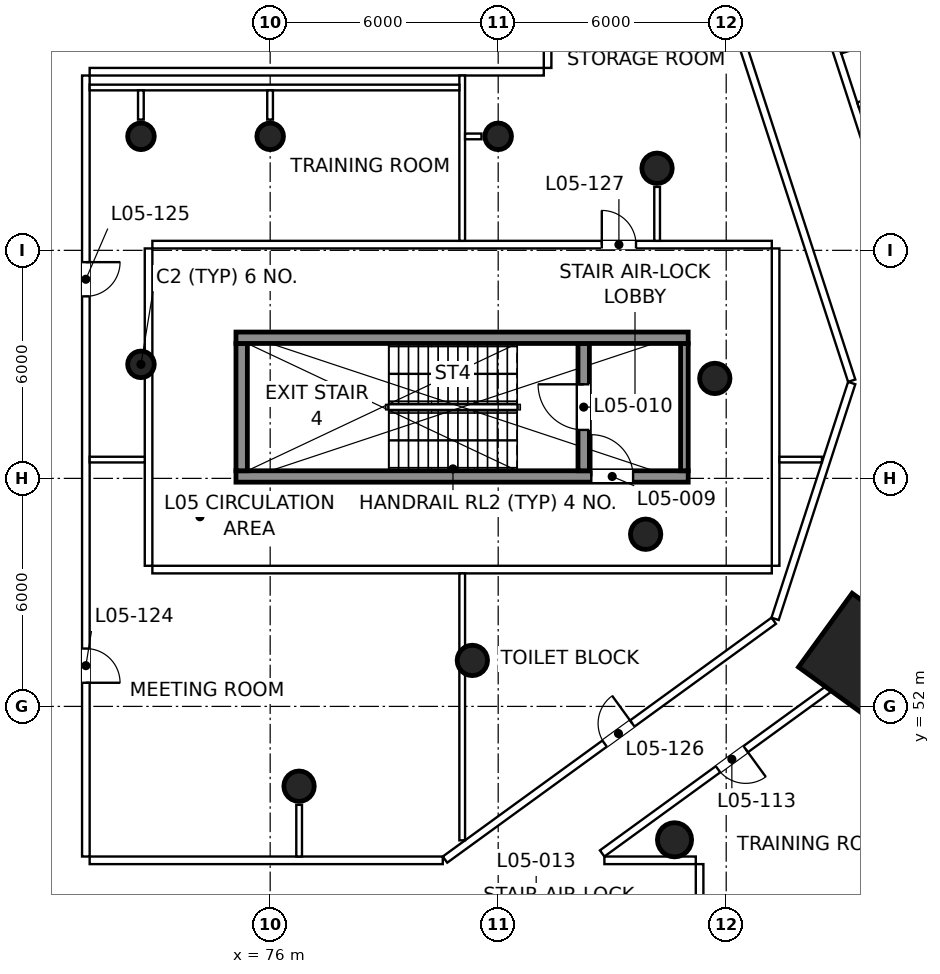
"""IFC4 building model, lengths in metres.
Left out: names, types, materials, properties, quantities, classifications, styles, units other than length and angle.
Written with IfcOpenShell. Run it as: python <this file> out.ifc"""

import sys

from ifc_helpers import new_model, si_unit, direction, frame, frame_2d, origin, origin_2d, place, context, subcontext, project, spatial, rectangle, circle, extrude, element, fill, save


model = new_model("IFC4")
c1 = context("Model", 3, precision=1e-05, world=origin(), true_north=direction((0.0, 1.0)))
c2 = subcontext(c1, "Body", "Model", "MODEL_VIEW")
j1 = project(units=[si_unit("LENGTHUNIT", "METRE"), si_unit("PLANEANGLEUNIT", "RADIAN")], contexts=[c1])
p1 = place(None, origin())
s1 = spatial("IfcSite", under=j1, at=p1, CompositionType="ELEMENT")
p2 = place(p1, origin())
s2 = spatial("IfcBuilding", under=s1, at=p2, CompositionType="ELEMENT")
p3 = place(p2, frame((0.0, 0.0, 34.0)))
s3 = spatial("IfcBuildingStorey", under=s2, at=p3, CompositionType="ELEMENT", Elevation=34.0)
p4 = place(p3, frame((86.64, 48.49, 0.0), z_axis=(0.0, 0.0, 1.0), x_axis=(1.0, 0.0, 0.0)))
e1 = element("IfcColumn", 1, at=p4, inside=s3, PredefinedType="COLUMN", context=c2, shape_type="SweptSolid", body=[
    extrude(circle(Radius=0.45, at=origin_2d()), origin(), (0.0, 0.0, 1.0), 5.0),
])
p5 = place(p3, frame((91.58, 53.3, 0.0), z_axis=(0.0, 0.0, 1.0), x_axis=(0.809016994375, -0.587785252292, 0.0)))
e2 = element("IfcColumn", 2, at=p5, inside=s3, PredefinedType="COLUMN", context=c2, shape_type="SweptSolid", body=[
    extrude(rectangle(XDim=2.4, YDim=2.4, at=origin_2d()), origin(), (0.0, 0.0, 1.0), 5.0),
])
for number, where, z_axis, x_axis in (
    (3, (76.76, 49.9, 0.0), (0.0, 0.0, 1.0), (1.0, 0.0, 0.0)),
    (4, (81.32, 53.21, 0.0), (0.0, 0.0, 1.0), (1.0, 0.0, 0.0)),
    (5, (85.88, 56.53, 0.0), (0.0, 0.0, 1.0), (1.0, 0.0, 0.0)),
    (6, (87.7, 60.63, 0.0), (0.0, 0.0, 1.0), (1.0, 0.0, 0.0)),
    (7, (86.18, 66.16, 0.0), (0.0, 0.0, 1.0), (1.0, 0.0, 0.0)),
):
    element("IfcColumn", number, at=place(p3, frame(where, z_axis=z_axis, x_axis=x_axis)), inside=s3, PredefinedType="COLUMN", context=c2, shape_type="SweptSolid", body=[
        extrude(circle(Radius=0.4, at=origin_2d()), origin(), (0.0, 0.0, 1.0), 5.0),
    ])
for number, where, z_axis, x_axis in (
    (8, (72.6, 61.0, 0.0), (0.0, 0.0, 1.0), (1.0, 0.0, 0.0)),
    (9, (72.6, 67.0, 0.0), (0.0, 0.0, 1.0), (1.0, 0.0, 0.0)),
    (10, (76.0, 67.0, 0.0), (0.0, 0.0, 1.0), (1.0, 0.0, 0.0)),
    (11, (82.0, 67.0, 0.0), (0.0, 0.0, 1.0), (1.0, 0.0, 0.0)),
):
    element("IfcColumn", number, at=place(p3, frame(where, z_axis=z_axis, x_axis=x_axis)), inside=s3, PredefinedType="COLUMN", context=c2, shape_type="SweptSolid", body=[
        extrude(circle(Radius=0.35, at=origin_2d()), origin(), (0.0, 0.0, 1.0), 5.0),
    ])
p6 = place(p3, frame((89.085, 42.836, 0.0), z_axis=(0.0, 0.0, 1.0), x_axis=(0.808999938455, 0.587808727036, 0.0)))
e12 = element("IfcWall", 12, at=p6, inside=s3, PredefinedType="SOLIDWALL", context=c2, shape_type="SweptSolid", body=[
    extrude(rectangle(XDim=9.0, YDim=0.32, at=frame_2d((4.5, 0.0))), origin(), (0.0, 0.0, 1.0), 0.9),
])
p7 = place(p3, frame((75.1, 58.05, 0.0), z_axis=(0.0, 0.0, 1.0), x_axis=(1.0, 0.0, 0.0)))
e13 = element("IfcWall", 13, at=p7, inside=s3, PredefinedType="SHEAR", context=c2, shape_type="SweptSolid", body=[
    extrude(rectangle(XDim=11.9, YDim=0.3, at=frame_2d((5.95, 0.0))), origin(), (0.0, 0.0, 1.0), 5.0),
])
p8 = place(p7, frame((9.35, 0.0, 0.0)))
e14 = element("IfcOpeningElement", 14, at=p8, cuts=e13, PredefinedType="OPENING", context=c2, shape_type="SweptSolid", body=[
    extrude(rectangle(XDim=1.1, YDim=2.1, at=frame_2d((0.55, 1.05))), frame((0.0, 0.16, 0.0), z_axis=(0.0, -1.0, 0.0), x_axis=(1.0, 0.0, 0.0)), (0.0, 0.0, 1.0), 0.32),
])
p9 = place(p3, frame((75.25, 58.2, 0.0), z_axis=(0.0, 0.0, 1.0), x_axis=(0.0, 1.0, 0.0)))
e15 = element("IfcWall", 15, at=p9, inside=s3, PredefinedType="SHEAR", context=c2, shape_type="SweptSolid", body=[
    extrude(rectangle(XDim=3.35, YDim=0.3, at=frame_2d((1.675, 0.0))), origin(), (0.0, 0.0, 1.0), 5.0),
])
p10 = place(p3, frame((84.25, 58.2, 0.0), z_axis=(0.0, 0.0, 1.0), x_axis=(0.0, 1.0, 0.0)))
e16 = element("IfcWall", 16, at=p10, inside=s3, PredefinedType="SHEAR", context=c2, shape_type="SweptSolid", body=[
    extrude(rectangle(XDim=3.35, YDim=0.3, at=frame_2d((1.675, 0.0))), origin(), (0.0, 0.0, 1.0), 5.0),
])
p11 = place(p10, frame((1.075, 0.0, 0.0)))
e17 = element("IfcOpeningElement", 17, at=p11, cuts=e16, PredefinedType="OPENING", context=c2, shape_type="SweptSolid", body=[
    extrude(rectangle(XDim=1.2, YDim=2.1, at=frame_2d((0.6, 1.05))), frame((0.0, 0.16, 0.0), z_axis=(0.0, -1.0, 0.0), x_axis=(1.0, 0.0, 0.0)), (0.0, 0.0, 1.0), 0.32),
])
p12 = place(p3, frame((86.9, 58.2, 0.0), z_axis=(0.0, 0.0, 1.0), x_axis=(0.0, 1.0, 0.0)))
e18 = element("IfcWall", 18, at=p12, inside=s3, PredefinedType="SHEAR", context=c2, shape_type="SweptSolid", body=[
    extrude(rectangle(XDim=3.35, YDim=0.2, at=frame_2d((1.675, 0.0))), origin(), (0.0, 0.0, 1.0), 5.0),
])
p13 = place(p3, frame((75.1, 61.7, 0.0), z_axis=(0.0, 0.0, 1.0), x_axis=(1.0, 0.0, 0.0)))
e19 = element("IfcWall", 19, at=p13, inside=s3, PredefinedType="SHEAR", context=c2, shape_type="SweptSolid", body=[
    extrude(rectangle(XDim=11.9, YDim=0.3, at=frame_2d((5.95, 0.0))), origin(), (0.0, 0.0, 1.0), 5.0),
])
p14 = place(p3, frame((87.105, 80.931, 0.0), z_axis=(0.0, 0.0, 1.0), x_axis=(0.309020575415, -0.951055352737, 0.0)))
e20 = element("IfcWall", 20, at=p14, inside=s3, PredefinedType="PARTITIONING", context=c2, shape_type="SweptSolid", body=[
    extrude(rectangle(XDim=21.409, YDim=0.2, at=frame_2d((10.704, 0.0))), origin(), (0.0, 0.0, 1.0), 3.9),
])
p15 = place(p14, frame((17.129, 0.0, 0.0)))
e21 = element("IfcOpeningElement", 21, at=p15, cuts=e20, PredefinedType="OPENING", context=c2, shape_type="SweptSolid", body=[
    extrude(rectangle(XDim=0.9, YDim=2.1, at=frame_2d((0.45, 1.05))), frame((0.0, 0.11, 0.0), z_axis=(0.0, -1.0, 0.0), x_axis=(1.0, 0.0, 0.0)), (0.0, 0.0, 1.0), 0.22),
])
p16 = place(p14, frame((8.866, 0.0, 0.0)))
e22 = element("IfcOpeningElement", 22, at=p16, cuts=e20, PredefinedType="OPENING", context=c2, shape_type="SweptSolid", body=[
    extrude(rectangle(XDim=0.9, YDim=2.1, at=frame_2d((0.45, 1.05))), frame((0.0, 0.11, 0.0), z_axis=(0.0, -1.0, 0.0), x_axis=(1.0, 0.0, 0.0)), (0.0, 0.0, 1.0), 0.22),
])
p17 = place(p14, frame((2.054, 0.0, 0.0)))
e23 = element("IfcOpeningElement", 23, at=p17, cuts=e20, PredefinedType="OPENING", context=c2, shape_type="SweptSolid", body=[
    extrude(rectangle(XDim=0.9, YDim=2.1, at=frame_2d((0.45, 1.05))), frame((0.0, 0.11, 0.0), z_axis=(0.0, -1.0, 0.0), x_axis=(1.0, 0.0, 0.0)), (0.0, 0.0, 1.0), 0.22),
])
p18 = place(p3, frame((93.721, 60.508, 0.0), z_axis=(0.0, 0.0, 1.0), x_axis=(-0.309030308026, -0.951052190325, 0.0)))
e24 = element("IfcWall", 24, at=p18, inside=s3, PredefinedType="PARTITIONING", context=c2, shape_type="SweptSolid", body=[
    extrude(rectangle(XDim=8.019, YDim=0.2, at=frame_2d((4.009, 0.0))), origin(), (0.0, 0.0, 1.0), 4.1),
])
p19 = place(p18, frame((4.83, 0.0, 0.0)))
e25 = element("IfcOpeningElement", 25, at=p19, cuts=e24, PredefinedType="OPENING", context=c2, shape_type="SweptSolid", body=[
    extrude(rectangle(XDim=0.9, YDim=2.1, at=frame_2d((0.45, 1.05))), frame((0.0, 0.11, 0.0), z_axis=(0.0, -1.0, 0.0), x_axis=(1.0, 0.0, 0.0)), (0.0, 0.0, 1.0), 0.22),
])
p20 = place(p18, frame((0.788, 0.0, 0.0)))
e26 = element("IfcOpeningElement", 26, at=p20, cuts=e24, PredefinedType="OPENING", context=c2, shape_type="SweptSolid", body=[
    extrude(rectangle(XDim=0.9, YDim=2.1, at=frame_2d((0.45, 1.05))), frame((0.0, 0.11, 0.0), z_axis=(0.0, -1.0, 0.0), x_axis=(1.0, 0.0, 0.0)), (0.0, 0.0, 1.0), 0.22),
])
p21 = place(p3, frame((91.207, 52.832, 0.0), z_axis=(0.0, 0.0, 1.0), x_axis=(-0.809021104528, -0.58777959511, 0.0)))
e27 = element("IfcWall", 27, at=p21, inside=s3, PredefinedType="PARTITIONING", context=c2, shape_type="SweptSolid", body=[
    extrude(rectangle(XDim=7.998, YDim=0.2, at=frame_2d((3.999, 0.0))), origin(), (0.0, 0.0, 1.0), 4.1),
])
p22 = place(p21, frame((3.33, 0.0, 0.0)))
e28 = element("IfcOpeningElement", 28, at=p22, cuts=e27, PredefinedType="OPENING", context=c2, shape_type="SweptSolid", body=[
    extrude(rectangle(XDim=0.9, YDim=2.1, at=frame_2d((0.45, 1.05))), frame((0.0, 0.11, 0.0), z_axis=(0.0, -1.0, 0.0), x_axis=(1.0, 0.0, 0.0)), (0.0, 0.0, 1.0), 0.22),
])
p23 = place(p3, frame((84.795, 47.95, 0.0), z_axis=(0.0, 0.0, 1.0), x_axis=(1.0, 0.0, 0.0)))
e29 = element("IfcWall", 29, at=p23, inside=s3, PredefinedType="PARTITIONING", context=c2, shape_type="SweptSolid", body=[
    extrude(rectangle(XDim=2.405, YDim=0.2, at=frame_2d((1.203, 0.0))), origin(), (0.0, 0.0, 1.0), 4.1),
])
p24 = place(p3, frame((87.3, 47.85, 0.0), z_axis=(0.0, 0.0, 1.0), x_axis=(0.0, -1.0, 0.0)))
e30 = element("IfcWall", 30, at=p24, inside=s3, PredefinedType="PARTITIONING", context=c2, shape_type="SweptSolid", body=[
    extrude(rectangle(XDim=6.113, YDim=0.2, at=frame_2d((3.057, 0.0))), origin(), (0.0, 0.0, 1.0), 3.9),
])
p25 = place(p24, frame((3.21, 0.0, 0.0)))
e31 = element("IfcOpeningElement", 31, at=p25, cuts=e30, PredefinedType="OPENING", context=c2, shape_type="SweptSolid", body=[
    extrude(rectangle(XDim=0.9, YDim=2.1, at=frame_2d((0.45, 1.05))), frame((0.0, 0.11, 0.0), z_axis=(0.0, -1.0, 0.0), x_axis=(1.0, 0.0, 0.0)), (0.0, 0.0, 1.0), 0.22),
])
p26 = place(p3, frame((89.287, 54.304, 0.0), z_axis=(0.0, 0.0, 1.0), x_axis=(0.308999759659, 0.951062116021, 0.0)))
e32 = element("IfcWall", 32, at=p26, inside=s3, PredefinedType="PARTITIONING", context=c2, shape_type="SweptSolid", body=[
    extrude(rectangle(XDim=6.524, YDim=0.2, at=frame_2d((3.262, 0.0))), origin(), (0.0, 0.0, 1.0), 4.6),
])
p27 = place(p3, frame((91.302, 60.57, 0.0), z_axis=(0.0, 0.0, 1.0), x_axis=(-0.309021827521, 0.951054945897, 0.0)))
e33 = element("IfcWall", 33, at=p27, inside=s3, PredefinedType="PARTITIONING", context=c2, shape_type="SweptSolid", body=[
    extrude(rectangle(XDim=18.99, YDim=0.2, at=frame_2d((9.495, 0.0))), origin(), (0.0, 0.0, 1.0), 4.6),
])
p28 = place(p3, frame((83.3, 78.6, 0.0), z_axis=(0.0, 0.0, 1.0), x_axis=(0.0, -1.0, 0.0)))
e34 = element("IfcWall", 34, at=p28, inside=s3, PredefinedType="PARTITIONING", context=c2, shape_type="SweptSolid", body=[
    extrude(rectangle(XDim=9.8, YDim=0.2, at=frame_2d((4.9, 0.0))), origin(), (0.0, 0.0, 1.0), 4.0),
])
p29 = place(p3, frame((83.2, 68.7, 0.0), z_axis=(0.0, 0.0, 1.0), x_axis=(-1.0, 0.0, 0.0)))
e35 = element("IfcWall", 35, at=p29, inside=s3, PredefinedType="PARTITIONING", context=c2, shape_type="SweptSolid", body=[
    extrude(rectangle(XDim=11.95, YDim=0.2, at=frame_2d((5.975, 0.0))), origin(), (0.0, 0.0, 1.0), 4.6),
])
p30 = place(p3, frame((71.15, 68.6, 0.0), z_axis=(0.0, 0.0, 1.0), x_axis=(0.0, -1.0, 0.0)))
e36 = element("IfcWall", 36, at=p30, inside=s3, PredefinedType="PARTITIONING", context=c2, shape_type="SweptSolid", body=[
    extrude(rectangle(XDim=20.55, YDim=0.2, at=frame_2d((10.275, 0.0))), origin(), (0.0, 0.0, 1.0), 4.6),
])
p31 = place(p30, frame((15.078, 0.0, 0.0)))
e37 = element("IfcOpeningElement", 37, at=p31, cuts=e36, PredefinedType="OPENING", context=c2, shape_type="SweptSolid", body=[
    extrude(rectangle(XDim=0.9, YDim=2.1, at=frame_2d((0.45, 1.05))), frame((0.0, 0.11, 0.0), z_axis=(0.0, -1.0, 0.0), x_axis=(1.0, 0.0, 0.0)), (0.0, 0.0, 1.0), 0.22),
])
p32 = place(p30, frame((4.911, 0.0, 0.0)))
e38 = element("IfcOpeningElement", 38, at=p32, cuts=e36, PredefinedType="OPENING", context=c2, shape_type="SweptSolid", body=[
    extrude(rectangle(XDim=0.9, YDim=2.1, at=frame_2d((0.45, 1.05))), frame((0.0, 0.11, 0.0), z_axis=(0.0, -1.0, 0.0), x_axis=(1.0, 0.0, 0.0)), (0.0, 0.0, 1.0), 0.22),
])
p33 = place(p3, frame((71.25, 47.95, 0.0), z_axis=(0.0, 0.0, 1.0), x_axis=(1.0, 0.0, 0.0)))
e39 = element("IfcWall", 39, at=p33, inside=s3, PredefinedType="PARTITIONING", context=c2, shape_type="SweptSolid", body=[
    extrude(rectangle(XDim=9.292, YDim=0.2, at=frame_2d((4.646, 0.0))), origin(), (0.0, 0.0, 1.0), 4.0),
])
p34 = place(p3, frame((80.6, 47.969, 0.0), z_axis=(0.0, 0.0, 1.0), x_axis=(0.809010498572, 0.587794192894, 0.0)))
e40 = element("IfcWall", 40, at=p34, inside=s3, PredefinedType="PARTITIONING", context=c2, shape_type="SweptSolid", body=[
    extrude(rectangle(XDim=10.692, YDim=0.2, at=frame_2d((5.346, 0.0))), origin(), (0.0, 0.0, 1.0), 4.6),
])
p35 = place(p34, frame((5.192, 0.0, 0.0)))
e41 = element("IfcOpeningElement", 41, at=p35, cuts=e40, PredefinedType="OPENING", context=c2, shape_type="SweptSolid", body=[
    extrude(rectangle(XDim=0.9, YDim=2.1, at=frame_2d((0.45, 1.05))), frame((0.0, 0.11, 0.0), z_axis=(0.0, -1.0, 0.0), x_axis=(1.0, 0.0, 0.0)), (0.0, 0.0, 1.0), 0.22),
])
p36 = place(p3, frame((72.9, 64.15, 0.0), z_axis=(0.0, 0.0, 1.0), x_axis=(1.0, 0.0, 0.0)))
e42 = element("IfcWall", 42, at=p36, inside=s3, PredefinedType="PARTITIONING", context=c2, shape_type="SweptSolid", body=[
    extrude(rectangle(XDim=16.3, YDim=0.2, at=frame_2d((8.15, 0.0))), origin(), (0.0, 0.0, 1.0), 4.0),
])
p37 = place(p36, frame((11.827, 0.0, 0.0)))
e43 = element("IfcOpeningElement", 43, at=p37, cuts=e42, PredefinedType="OPENING", context=c2, shape_type="SweptSolid", body=[
    extrude(rectangle(XDim=0.9, YDim=2.1, at=frame_2d((0.45, 1.05))), frame((0.0, 0.11, 0.0), z_axis=(0.0, -1.0, 0.0), x_axis=(1.0, 0.0, 0.0)), (0.0, 0.0, 1.0), 0.22),
])
p38 = place(p3, frame((89.3, 64.05, 0.0), z_axis=(0.0, 0.0, 1.0), x_axis=(0.0, -1.0, 0.0)))
e44 = element("IfcWall", 44, at=p38, inside=s3, PredefinedType="PARTITIONING", context=c2, shape_type="SweptSolid", body=[
    extrude(rectangle(XDim=8.35, YDim=0.2, at=frame_2d((4.175, 0.0))), origin(), (0.0, 0.0, 1.0), 4.6),
])
p39 = place(p3, frame((89.2, 55.6, 0.0), z_axis=(0.0, 0.0, 1.0), x_axis=(-1.0, 0.0, 0.0)))
e45 = element("IfcWall", 45, at=p39, inside=s3, PredefinedType="PARTITIONING", context=c2, shape_type="SweptSolid", body=[
    extrude(rectangle(XDim=16.3, YDim=0.2, at=frame_2d((8.15, 0.0))), origin(), (0.0, 0.0, 1.0), 4.0),
])
p40 = place(p3, frame((72.8, 55.7, 0.0), z_axis=(0.0, 0.0, 1.0), x_axis=(0.0, 1.0, 0.0)))
e46 = element("IfcWall", 46, at=p40, inside=s3, PredefinedType="PARTITIONING", context=c2, shape_type="SweptSolid", body=[
    extrude(rectangle(XDim=8.35, YDim=0.2, at=frame_2d((4.175, 0.0))), origin(), (0.0, 0.0, 1.0), 4.6),
])
p41 = place(p3, frame((96.915, 48.723, 0.0), z_axis=(0.0, 0.0, 1.0), x_axis=(-0.809006827345, 0.587799245754, 0.0)))
e47 = element("IfcWall", 47, at=p41, inside=s3, PredefinedType="PARTITIONING", context=c2, shape_type="SweptSolid", body=[
    extrude(rectangle(XDim=6.939, YDim=0.15, at=frame_2d((3.469, 0.0))), origin(), (0.0, 0.0, 1.0), 4.6),
])
p42 = place(p3, frame((97.728, 69.855, 0.0), z_axis=(0.0, 0.0, 1.0), x_axis=(-0.951049337045, -0.309039088961, 0.0)))
e48 = element("IfcWall", 48, at=p42, inside=s3, PredefinedType="PARTITIONING", context=c2, shape_type="SweptSolid", body=[
    extrude(rectangle(XDim=6.58, YDim=0.15, at=frame_2d((3.29, 0.0))), origin(), (0.0, 0.0, 1.0), 4.1),
])
p43 = place(p3, frame((81.053, 48.476, 0.0), z_axis=(0.0, 0.0, 1.0), x_axis=(0.0, 1.0, 0.0)))
e49 = element("IfcWall", 49, at=p43, inside=s3, PredefinedType="PARTITIONING", context=c2, shape_type="SweptSolid", body=[
    extrude(rectangle(XDim=7.024, YDim=0.15, at=frame_2d((3.512, 0.0))), origin(), (0.0, 0.0, 1.0), 4.0),
])
p44 = place(p3, frame((81.053, 64.25, 0.0), z_axis=(0.0, 0.0, 1.0), x_axis=(0.0, 1.0, 0.0)))
e50 = element("IfcWall", 50, at=p44, inside=s3, PredefinedType="PARTITIONING", context=c2, shape_type="SweptSolid", body=[
    extrude(rectangle(XDim=4.35, YDim=0.15, at=frame_2d((2.175, 0.0))), origin(), (0.0, 0.0, 1.0), 4.6),
])
p45 = place(p3, frame((71.25, 58.494, 0.0), z_axis=(0.0, 0.0, 1.0), x_axis=(1.0, 0.0, 0.0)))
e51 = element("IfcWall", 51, at=p45, inside=s3, PredefinedType="PARTITIONING", context=c2, shape_type="SweptSolid", body=[
    extrude(rectangle(XDim=1.45, YDim=0.15, at=frame_2d((0.725, 0.0))), origin(), (0.0, 0.0, 1.0), 4.6),
])
p46 = place(p3, frame((89.4, 58.494, 0.0), z_axis=(0.0, 0.0, 1.0), x_axis=(1.0, 0.0, 0.0)))
e52 = element("IfcWall", 52, at=p46, inside=s3, PredefinedType="PARTITIONING", context=c2, shape_type="SweptSolid", body=[
    extrude(rectangle(XDim=1.119, YDim=0.15, at=frame_2d((0.559, 0.0))), origin(), (0.0, 0.0, 1.0), 4.6),
])
p47 = place(p3, frame((71.25, 68.285, 0.0), z_axis=(0.0, 0.0, 1.0), x_axis=(1.0, 0.0, 0.0)))
e53 = element("IfcWall", 53, at=p47, inside=s3, PredefinedType="PARTITIONING", context=c2, shape_type="SweptSolid", body=[
    extrude(rectangle(XDim=9.729, YDim=0.15, at=frame_2d((4.864, 0.0))), origin(), (0.0, 0.0, 1.0), 4.6),
])
p48 = place(p3, frame((91.828, 69.519, 0.0), z_axis=(0.0, 0.0, 1.0), x_axis=(-0.95113772004, -0.308766963123, 0.0)))
e54 = element("IfcWall", 54, at=p48, inside=s3, PredefinedType="PARTITIONING", context=c2, shape_type="SweptSolid", body=[
    extrude(rectangle(XDim=0.865, YDim=0.15, at=frame_2d((0.433, 0.0))), origin(), (0.0, 0.0, 1.0), 4.6),
])
p49 = place(p3, frame((76.762, 49.41, 0.0), z_axis=(0.0, 0.0, 1.0), x_axis=(0.0, -1.0, 0.0)))
e55 = element("IfcWall", 55, at=p49, inside=s3, PredefinedType="PARTITIONING", context=c2, shape_type="SweptSolid", body=[
    extrude(rectangle(XDim=1.36, YDim=0.15, at=frame_2d((0.68, 0.0))), origin(), (0.0, 0.0, 1.0), 4.6),
])
p50 = place(p3, frame((86.182, 65.67, 0.0), z_axis=(0.0, 0.0, 1.0), x_axis=(0.0, -1.0, 0.0)))
e56 = element("IfcWall", 56, at=p50, inside=s3, PredefinedType="PARTITIONING", context=c2, shape_type="SweptSolid", body=[
    extrude(rectangle(XDim=1.42, YDim=0.15, at=frame_2d((0.71, 0.0))), origin(), (0.0, 0.0, 1.0), 4.0),
])
for number, where, z_axis, x_axis in (
    (57, (72.598, 67.44, 0.0), (0.0, 0.0, 1.0), (0.0, 1.0, 0.0)),
    (58, (75.998, 67.44, 0.0), (0.0, 0.0, 1.0), (0.0, 1.0, 0.0)),
):
    element("IfcWall", number, at=place(p3, frame(where, z_axis=z_axis, x_axis=x_axis)), inside=s3, PredefinedType="PARTITIONING", context=c2, shape_type="SweptSolid", body=[
        extrude(rectangle(XDim=0.77, YDim=0.15, at=frame_2d((0.385, 0.0))), origin(), (0.0, 0.0, 1.0), 4.6),
    ])
p51 = place(p3, frame((81.56, 66.998, 0.0), z_axis=(0.0, 0.0, 1.0), x_axis=(-1.0, 0.0, 0.0)))
e59 = element("IfcWall", 59, at=p51, inside=s3, PredefinedType="PARTITIONING", context=c2, shape_type="SweptSolid", body=[
    extrude(rectangle(XDim=0.432, YDim=0.15, at=frame_2d((0.216, 0.0))), origin(), (0.0, 0.0, 1.0), 4.6),
])
p52 = place(p8, origin())
e60 = element("IfcDoor", 60, at=p52, inside=s3, OperationType="SINGLE_SWING_LEFT", PredefinedType="DOOR", context=c2, shape_type="SweptSolid", body=[
    extrude(rectangle(XDim=1.1, YDim=2.1, at=frame_2d((0.55, 1.05))), frame((0.0, 0.025, 0.0), z_axis=(0.0, -1.0, 0.0), x_axis=(1.0, 0.0, 0.0)), (0.0, 0.0, 1.0), 0.05),
])
fill(e14, e60)
p53 = place(p11, origin())
e61 = element("IfcDoor", 61, at=p53, inside=s3, OperationType="SINGLE_SWING_RIGHT", PredefinedType="DOOR", context=c2, shape_type="SweptSolid", body=[
    extrude(rectangle(XDim=1.2, YDim=2.1, at=frame_2d((0.6, 1.05))), frame((0.0, 0.025, 0.0), z_axis=(0.0, -1.0, 0.0), x_axis=(1.0, 0.0, 0.0)), (0.0, 0.0, 1.0), 0.05),
])
fill(e17, e61)
p54 = place(p22, origin())
e62 = element("IfcDoor", 62, at=p54, inside=s3, OperationType="SINGLE_SWING_LEFT", PredefinedType="DOOR", context=c2, shape_type="SweptSolid", body=[
    extrude(rectangle(XDim=0.9, YDim=2.1, at=frame_2d((0.45, 1.05))), frame((0.0, 0.025, 0.0), z_axis=(0.0, -1.0, 0.0), x_axis=(1.0, 0.0, 0.0)), (0.0, 0.0, 1.0), 0.05),
])
fill(e28, e62)
p55 = place(p31, origin())
e63 = element("IfcDoor", 63, at=p55, inside=s3, OperationType="SINGLE_SWING_RIGHT", PredefinedType="DOOR", context=c2, shape_type="SweptSolid", body=[
    extrude(rectangle(XDim=0.9, YDim=2.1, at=frame_2d((0.45, 1.05))), frame((0.0, 0.025, 0.0), z_axis=(0.0, -1.0, 0.0), x_axis=(1.0, 0.0, 0.0)), (0.0, 0.0, 1.0), 0.05),
])
fill(e37, e63)
p56 = place(p32, origin())
e64 = element("IfcDoor", 64, at=p56, inside=s3, OperationType="SINGLE_SWING_LEFT", PredefinedType="DOOR", context=c2, shape_type="SweptSolid", body=[
    extrude(rectangle(XDim=0.9, YDim=2.1, at=frame_2d((0.45, 1.05))), frame((0.0, 0.025, 0.0), z_axis=(0.0, -1.0, 0.0), x_axis=(1.0, 0.0, 0.0)), (0.0, 0.0, 1.0), 0.05),
])
fill(e38, e64)
p57 = place(p35, origin())
e65 = element("IfcDoor", 65, at=p57, inside=s3, OperationType="SINGLE_SWING_RIGHT", PredefinedType="DOOR", context=c2, shape_type="SweptSolid", body=[
    extrude(rectangle(XDim=0.9, YDim=2.1, at=frame_2d((0.45, 1.05))), frame((0.0, 0.025, 0.0), z_axis=(0.0, -1.0, 0.0), x_axis=(1.0, 0.0, 0.0)), (0.0, 0.0, 1.0), 0.05),
])
fill(e41, e65)
p58 = place(p37, origin())
e66 = element("IfcDoor", 66, at=p58, inside=s3, OperationType="SINGLE_SWING_LEFT", PredefinedType="DOOR", context=c2, shape_type="SweptSolid", body=[
    extrude(rectangle(XDim=0.9, YDim=2.1, at=frame_2d((0.45, 1.05))), frame((0.0, 0.025, 0.0), z_axis=(0.0, -1.0, 0.0), x_axis=(1.0, 0.0, 0.0)), (0.0, 0.0, 1.0), 0.05),
])
fill(e43, e66)
save(model, sys.argv[1])
